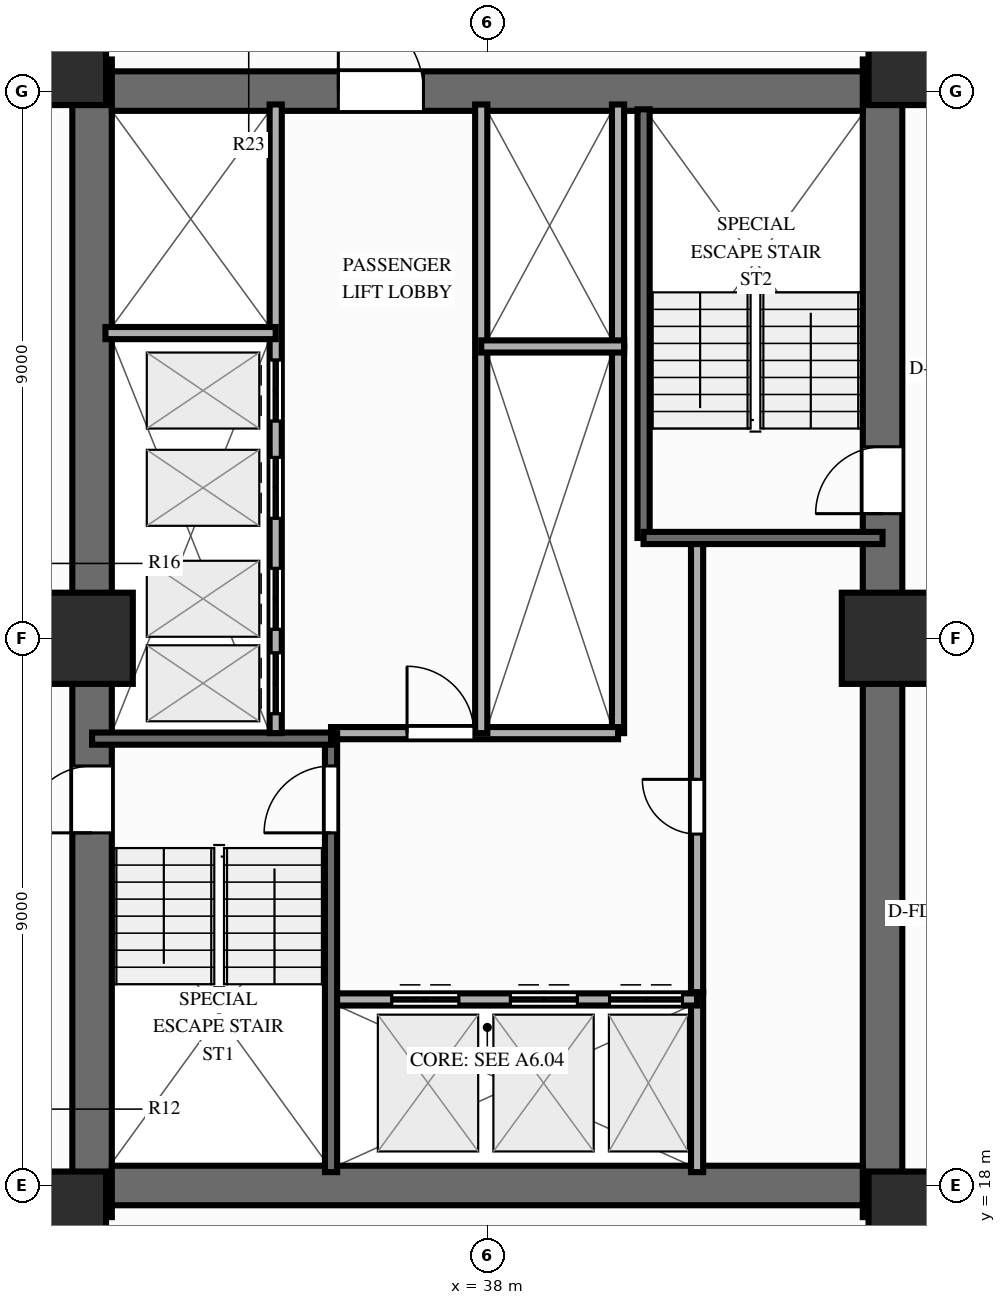
"""IFC4 building model, lengths in metres.
Left out: names, types, materials, properties, quantities, classifications, styles, units other than length and angle.
Written with IfcOpenShell. Run it as: python <this file> out.ifc"""

import sys

from ifc_helpers import new_model, si_unit, direction, frame, frame_2d, origin, origin_2d, place, context, subcontext, project, spatial, rectangle, extrude, source, transform, mapped, element, fill, save


model = new_model("IFC4")
c1 = context("Model", 3, precision=1e-05, world=origin(), true_north=direction((0.0, 1.0)))
c2 = subcontext(c1, "Body", "Model", "MODEL_VIEW")
j1 = project(units=[si_unit("LENGTHUNIT", "METRE"), si_unit("PLANEANGLEUNIT", "RADIAN")], contexts=[c1])
p1 = place(None, origin())
s1 = spatial("IfcSite", under=j1, at=p1, CompositionType="ELEMENT")
p2 = place(p1, origin())
s2 = spatial("IfcBuilding", under=s1, at=p2, CompositionType="ELEMENT")
p3 = place(p2, frame((0.0, 0.0, 49.4)))
s3 = spatial("IfcBuildingStorey", under=s2, at=p3, CompositionType="ELEMENT", Elevation=49.4)
p4 = place(p3, frame((31.5, 17.48, 0.0), z_axis=(0.0, 0.0, 1.0), x_axis=(0.0, 1.0, 0.0)))
e1 = element("IfcWall", 1, at=p4, inside=s3, PredefinedType="SHEAR", context=c2, shape_type="SweptSolid", body=[
    extrude(rectangle(XDim=19.04, YDim=0.65, at=frame_2d((9.52, 0.0))), origin(), (0.0, 0.0, 1.0), 3.0),
])
p5 = place(p4, frame((6.32, 0.0, 0.0)))
e2 = element("IfcOpeningElement", 2, at=p5, cuts=e1, PredefinedType="OPENING", context=c2, shape_type="SweptSolid", body=[
    extrude(rectangle(XDim=1.1, YDim=2.15, at=frame_2d((0.55, 1.075))), frame((0.0, 0.337, 0.0), z_axis=(0.0, -1.0, 0.0), x_axis=(1.0, 0.0, 0.0)), (0.0, 0.0, 1.0), 0.674),
])
p6 = place(p3, frame((44.5, 17.48, 0.0), z_axis=(0.0, 0.0, 1.0), x_axis=(0.0, 1.0, 0.0)))
e3 = element("IfcWall", 3, at=p6, inside=s3, PredefinedType="SHEAR", context=c2, shape_type="SweptSolid", body=[
    extrude(rectangle(XDim=19.04, YDim=0.65, at=frame_2d((9.52, 0.0))), origin(), (0.0, 0.0, 1.0), 3.0),
])
p7 = place(p6, frame((12.67, 0.0, 0.0), z_axis=(0.0, 0.0, 1.0), x_axis=(-1.0, 0.0, 0.0)))
e4 = element("IfcOpeningElement", 4, at=p7, cuts=e3, PredefinedType="OPENING", context=c2, shape_type="SweptSolid", body=[
    extrude(rectangle(XDim=1.1, YDim=2.15, at=frame_2d((0.55, 1.075))), frame((0.0, 0.337, 0.0), z_axis=(0.0, -1.0, 0.0), x_axis=(1.0, 0.0, 0.0)), (0.0, 0.0, 1.0), 0.674),
])
p8 = place(p3, frame((31.825, 18.0, 0.0), z_axis=(0.0, 0.0, 1.0), x_axis=(1.0, 0.0, 0.0)))
e5 = element("IfcWall", 5, at=p8, inside=s3, PredefinedType="SHEAR", context=c2, shape_type="SweptSolid", body=[
    extrude(rectangle(XDim=12.35, YDim=0.65, at=frame_2d((6.175, 0.0))), origin(), (0.0, 0.0, 1.0), 3.0),
])
p9 = place(p3, frame((31.825, 36.0, 0.0), z_axis=(0.0, 0.0, 1.0), x_axis=(1.0, 0.0, 0.0)))
e6 = element("IfcWall", 6, at=p9, inside=s3, PredefinedType="SHEAR", context=c2, shape_type="SweptSolid", body=[
    extrude(rectangle(XDim=12.35, YDim=0.65, at=frame_2d((6.175, 0.0))), origin(), (0.0, 0.0, 1.0), 3.0),
])
p10 = place(p9, frame((5.125, 0.0, 0.0), z_axis=(0.0, 0.0, 1.0), x_axis=(-1.0, 0.0, 0.0)))
e7 = element("IfcOpeningElement", 7, at=p10, cuts=e6, PredefinedType="OPENING", context=c2, shape_type="SweptSolid", body=[
    extrude(rectangle(XDim=1.4, YDim=2.15, at=frame_2d((0.7, 1.075))), frame((0.0, 0.337, 0.0), z_axis=(0.0, -1.0, 0.0), x_axis=(1.0, 0.0, 0.0)), (0.0, 0.0, 1.0), 0.674),
])
m1 = source(origin(), c2, "Body", "SweptSolid", [
    extrude(rectangle(XDim=1.5, YDim=1.5, at=origin_2d()), origin(), (0.0, 0.0, 1.0), 3.0),
])
for number, where, z_axis, x_axis in (
    (8, (30.98, 17.48, 0.0), (0.0, 0.0, 1.0), (1.0, 0.0, 0.0)),
    (9, (45.02, 17.48, 0.0), (0.0, 0.0, 1.0), (1.0, 0.0, 0.0)),
    (10, (30.98, 36.52, 0.0), (0.0, 0.0, 1.0), (1.0, 0.0, 0.0)),
    (11, (45.02, 36.52, 0.0), (0.0, 0.0, 1.0), (1.0, 0.0, 0.0)),
    (12, (31.42, 27.0, 0.0), (0.0, 0.0, 1.0), (1.0, 0.0, 0.0)),
    (13, (44.58, 27.0, 0.0), (0.0, 0.0, 1.0), (1.0, 0.0, 0.0)),
):
    element("IfcColumn", number, at=place(p3, frame(where, z_axis=z_axis, x_axis=x_axis)), inside=s3, PredefinedType="COLUMN", context=c2, shape_type="MappedRepresentation", body=[
        mapped(m1, transform((0.0, 0.0, 0.0), scale=1.0)),
    ])
p11 = place(p3, frame((41.45, 18.22, 0.0), z_axis=(0.0, 0.0, 1.0), x_axis=(0.0, 1.0, 0.0)))
e14 = element("IfcWall", 14, at=p11, inside=s3, PredefinedType="PARTITIONING", context=c2, shape_type="SweptSolid", body=[
    extrude(rectangle(XDim=2.96, YDim=0.2, at=frame_2d((1.48, 0.0))), origin(), (0.0, 0.0, 1.0), 2.79),
])
p12 = place(p3, frame((41.45, 21.18, 0.0), z_axis=(0.0, 0.0, 1.0), x_axis=(0.0, 1.0, 0.0)))
e15 = element("IfcWall", 15, at=p12, inside=s3, PredefinedType="PARTITIONING", context=c2, shape_type="SweptSolid", body=[
    extrude(rectangle(XDim=7.42, YDim=0.2, at=frame_2d((3.71, 0.0))), origin(), (0.0, 0.0, 1.0), 2.79),
])
p13 = place(p12, frame((2.6, 0.0, 0.0)))
e16 = element("IfcOpeningElement", 16, at=p13, cuts=e15, PredefinedType="OPENING", context=c2, shape_type="SweptSolid", body=[
    extrude(rectangle(XDim=0.9, YDim=2.1, at=frame_2d((0.45, 1.05))), frame((0.0, 0.112, 0.0), z_axis=(0.0, -1.0, 0.0), x_axis=(1.0, 0.0, 0.0)), (0.0, 0.0, 1.0), 0.224),
])
p14 = place(p3, frame((40.15, 25.44, 0.0), z_axis=(0.0, 0.0, 1.0), x_axis=(0.0, 1.0, 0.0)))
e17 = element("IfcWall", 17, at=p14, inside=s3, PredefinedType="PARTITIONING", context=c2, shape_type="SweptSolid", body=[
    extrude(rectangle(XDim=6.36, YDim=0.2, at=frame_2d((3.18, 0.0))), origin(), (0.0, 0.0, 1.0), 2.79),
])
p15 = place(p3, frame((40.15, 31.8, 0.0), z_axis=(0.0, 0.0, 1.0), x_axis=(0.0, 1.0, 0.0)))
e18 = element("IfcWall", 18, at=p15, inside=s3, PredefinedType="PARTITIONING", context=c2, shape_type="SweptSolid", body=[
    extrude(rectangle(XDim=3.98, YDim=0.2, at=frame_2d((1.99, 0.0))), origin(), (0.0, 0.0, 1.0), 2.79),
])
p16 = place(p3, frame((35.43, 21.06, 0.0), z_axis=(0.0, 0.0, 1.0), x_axis=(1.0, 0.0, 0.0)))
e19 = element("IfcWall", 19, at=p16, inside=s3, PredefinedType="PARTITIONING", context=c2, shape_type="SweptSolid", body=[
    extrude(rectangle(XDim=6.02, YDim=0.2, at=frame_2d((3.01, 0.0))), origin(), (0.0, 0.0, 1.0), 2.79),
])
p17 = place(p16, frame((1.0, 0.0, 0.0)))
e20 = element("IfcOpeningElement", 20, at=p17, cuts=e19, PredefinedType="OPENING", context=c2, shape_type="SweptSolid", body=[
    extrude(rectangle(XDim=1.1, YDim=2.15, at=frame_2d((0.55, 1.075))), frame((0.0, 0.112, 0.0), z_axis=(0.0, -1.0, 0.0), x_axis=(1.0, 0.0, 0.0)), (0.0, 0.0, 1.0), 0.224),
])
p18 = place(p16, frame((2.95, 0.0, 0.0)))
e21 = element("IfcOpeningElement", 21, at=p18, cuts=e19, PredefinedType="OPENING", context=c2, shape_type="SweptSolid", body=[
    extrude(rectangle(XDim=1.1, YDim=2.15, at=frame_2d((0.55, 1.075))), frame((0.0, 0.112, 0.0), z_axis=(0.0, -1.0, 0.0), x_axis=(1.0, 0.0, 0.0)), (0.0, 0.0, 1.0), 0.224),
])
p19 = place(p16, frame((4.58, 0.0, 0.0)))
e22 = element("IfcOpeningElement", 22, at=p19, cuts=e19, PredefinedType="OPENING", context=c2, shape_type="SweptSolid", body=[
    extrude(rectangle(XDim=1.2, YDim=2.15, at=frame_2d((0.6, 1.075))), frame((0.0, 0.112, 0.0), z_axis=(0.0, -1.0, 0.0), x_axis=(1.0, 0.0, 0.0)), (0.0, 0.0, 1.0), 0.224),
])
p20 = place(p3, frame((35.43, 25.44, 0.0), z_axis=(0.0, 0.0, 1.0), x_axis=(1.0, 0.0, 0.0)))
e23 = element("IfcWall", 23, at=p20, inside=s3, PredefinedType="PARTITIONING", context=c2, shape_type="SweptSolid", body=[
    extrude(rectangle(XDim=4.72, YDim=0.2, at=frame_2d((2.36, 0.0))), origin(), (0.0, 0.0, 1.0), 2.79),
])
p21 = place(p20, frame((1.25, 0.0, 0.0)))
e24 = element("IfcOpeningElement", 24, at=p21, cuts=e23, PredefinedType="OPENING", context=c2, shape_type="SweptSolid", body=[
    extrude(rectangle(XDim=1.1, YDim=2.15, at=frame_2d((0.55, 1.075))), frame((0.0, 0.112, 0.0), z_axis=(0.0, -1.0, 0.0), x_axis=(1.0, 0.0, 0.0)), (0.0, 0.0, 1.0), 0.224),
])
p22 = place(p3, frame((35.43, 18.22, 0.0), z_axis=(0.0, 0.0, 1.0), x_axis=(0.0, 1.0, 0.0)))
e25 = element("IfcWall", 25, at=p22, inside=s3, PredefinedType="SOLIDWALL", context=c2, shape_type="SweptSolid", body=[
    extrude(rectangle(XDim=7.22, YDim=0.2, at=frame_2d((3.61, 0.0))), origin(), (0.0, 0.0, 1.0), 2.79),
])
p23 = place(p22, frame((6.68, 0.0, 0.0), z_axis=(0.0, 0.0, 1.0), x_axis=(-1.0, 0.0, 0.0)))
e26 = element("IfcOpeningElement", 26, at=p23, cuts=e25, PredefinedType="OPENING", context=c2, shape_type="SweptSolid", body=[
    extrude(rectangle(XDim=1.1, YDim=2.15, at=frame_2d((0.55, 1.075))), frame((0.0, 0.112, 0.0), z_axis=(0.0, -1.0, 0.0), x_axis=(1.0, 0.0, 0.0)), (0.0, 0.0, 1.0), 0.224),
])
p24 = place(p3, frame((31.5, 25.35, 0.0), z_axis=(0.0, 0.0, 1.0), x_axis=(1.0, 0.0, 0.0)))
e27 = element("IfcWall", 27, at=p24, inside=s3, PredefinedType="SOLIDWALL", context=c2, shape_type="SweptSolid", body=[
    extrude(rectangle(XDim=3.93, YDim=0.2, at=frame_2d((1.965, 0.0))), origin(), (0.0, 0.0, 1.0), 2.79),
])
p25 = place(p3, frame((40.57, 28.65, 0.0), z_axis=(0.0, 0.0, 1.0), x_axis=(0.0, 1.0, 0.0)))
e28 = element("IfcWall", 28, at=p25, inside=s3, PredefinedType="SOLIDWALL", context=c2, shape_type="SweptSolid", body=[
    extrude(rectangle(XDim=7.05, YDim=0.2, at=frame_2d((3.525, 0.0))), origin(), (0.0, 0.0, 1.0), 2.79),
])
p26 = place(p3, frame((40.57, 28.65, 0.0), z_axis=(0.0, 0.0, 1.0), x_axis=(1.0, 0.0, 0.0)))
e29 = element("IfcWall", 29, at=p26, inside=s3, PredefinedType="SOLIDWALL", context=c2, shape_type="SweptSolid", body=[
    extrude(rectangle(XDim=3.93, YDim=0.2, at=frame_2d((1.965, 0.0))), origin(), (0.0, 0.0, 1.0), 2.79),
])
p27 = place(p3, frame((34.52, 25.44, 0.0), z_axis=(0.0, 0.0, 1.0), x_axis=(0.0, 1.0, 0.0)))
e30 = element("IfcWall", 30, at=p27, inside=s3, PredefinedType="PARTITIONING", context=c2, shape_type="SweptSolid", body=[
    extrude(rectangle(XDim=10.34, YDim=0.2, at=frame_2d((5.17, 0.0))), origin(), (0.0, 0.0, 1.0), 2.79),
])
p28 = place(p27, frame((0.32, 0.0, 0.0)))
e31 = element("IfcOpeningElement", 31, at=p28, cuts=e30, PredefinedType="OPENING", context=c2, shape_type="SweptSolid", body=[
    extrude(rectangle(XDim=1.0, YDim=2.15, at=frame_2d((0.5, 1.075))), frame((0.0, 0.112, 0.0), z_axis=(0.0, -1.0, 0.0), x_axis=(1.0, 0.0, 0.0)), (0.0, 0.0, 1.0), 0.224),
])
p29 = place(p27, frame((1.71, 0.0, 0.0)))
e32 = element("IfcOpeningElement", 32, at=p29, cuts=e30, PredefinedType="OPENING", context=c2, shape_type="SweptSolid", body=[
    extrude(rectangle(XDim=1.0, YDim=2.15, at=frame_2d((0.5, 1.075))), frame((0.0, 0.112, 0.0), z_axis=(0.0, -1.0, 0.0), x_axis=(1.0, 0.0, 0.0)), (0.0, 0.0, 1.0), 0.224),
])
p30 = place(p27, frame((3.535, 0.0, 0.0)))
e33 = element("IfcOpeningElement", 33, at=p30, cuts=e30, PredefinedType="OPENING", context=c2, shape_type="SweptSolid", body=[
    extrude(rectangle(XDim=1.0, YDim=2.15, at=frame_2d((0.5, 1.075))), frame((0.0, 0.112, 0.0), z_axis=(0.0, -1.0, 0.0), x_axis=(1.0, 0.0, 0.0)), (0.0, 0.0, 1.0), 0.224),
])
p31 = place(p27, frame((5.135, 0.0, 0.0)))
e34 = element("IfcOpeningElement", 34, at=p31, cuts=e30, PredefinedType="OPENING", context=c2, shape_type="SweptSolid", body=[
    extrude(rectangle(XDim=1.0, YDim=2.15, at=frame_2d((0.5, 1.075))), frame((0.0, 0.112, 0.0), z_axis=(0.0, -1.0, 0.0), x_axis=(1.0, 0.0, 0.0)), (0.0, 0.0, 1.0), 0.224),
])
p32 = place(p3, frame((31.72, 32.02, 0.0), z_axis=(0.0, 0.0, 1.0), x_axis=(1.0, 0.0, 0.0)))
e35 = element("IfcWall", 35, at=p32, inside=s3, PredefinedType="PARTITIONING", context=c2, shape_type="SweptSolid", body=[
    extrude(rectangle(XDim=2.8, YDim=0.2, at=frame_2d((1.4, 0.0))), origin(), (0.0, 0.0, 1.0), 2.79),
])
p33 = place(p3, frame((37.9, 25.44, 0.0), z_axis=(0.0, 0.0, 1.0), x_axis=(0.0, 1.0, 0.0)))
e36 = element("IfcWall", 36, at=p33, inside=s3, PredefinedType="PARTITIONING", context=c2, shape_type="SweptSolid", body=[
    extrude(rectangle(XDim=10.34, YDim=0.2, at=frame_2d((5.17, 0.0))), origin(), (0.0, 0.0, 1.0), 2.79),
])
p34 = place(p3, frame((37.9, 31.8, 0.0), z_axis=(0.0, 0.0, 1.0), x_axis=(1.0, 0.0, 0.0)))
e37 = element("IfcWall", 37, at=p34, inside=s3, PredefinedType="PARTITIONING", context=c2, shape_type="SweptSolid", body=[
    extrude(rectangle(XDim=2.35, YDim=0.2, at=frame_2d((1.175, 0.0))), origin(), (0.0, 0.0, 1.0), 2.79),
])
m2 = source(origin(), c2, "Body", "SweptSolid", [
    extrude(rectangle(XDim=1.1, YDim=2.15, at=frame_2d((0.55, 1.075))), frame((0.0, 0.025, 0.0), z_axis=(0.0, -1.0, 0.0), x_axis=(1.0, 0.0, 0.0)), (0.0, 0.0, 1.0), 0.05),
])
p35 = place(p5, origin())
e38 = element("IfcDoor", 38, at=p35, inside=s3, OperationType="SINGLE_SWING_LEFT", PredefinedType="DOOR", context=c2, shape_type="MappedRepresentation", body=[
    mapped(m2, transform((0.0, 0.0, 0.0), scale=1.0)),
])
fill(e2, e38)
p36 = place(p7, origin())
e39 = element("IfcDoor", 39, at=p36, inside=s3, OperationType="SINGLE_SWING_RIGHT", PredefinedType="DOOR", context=c2, shape_type="MappedRepresentation", body=[
    mapped(m2, transform((0.0, 0.0, 0.0), scale=1.0)),
])
fill(e4, e39)
m3 = source(origin(), c2, "Body", "SweptSolid", [
    extrude(rectangle(XDim=1.4, YDim=2.15, at=frame_2d((0.7, 1.075))), frame((0.0, 0.025, 0.0), z_axis=(0.0, -1.0, 0.0), x_axis=(1.0, 0.0, 0.0)), (0.0, 0.0, 1.0), 0.05),
])
p37 = place(p10, origin())
e40 = element("IfcDoor", 40, at=p37, inside=s3, OperationType="SINGLE_SWING_RIGHT", PredefinedType="DOOR", context=c2, shape_type="MappedRepresentation", body=[
    mapped(m3, transform((0.0, 0.0, 0.0), scale=1.0)),
])
fill(e7, e40)
m4 = source(origin(), c2, "Body", "SweptSolid", [
    extrude(rectangle(XDim=0.9, YDim=2.1, at=frame_2d((0.45, 1.05))), frame((0.0, 0.025, 0.0), z_axis=(0.0, -1.0, 0.0), x_axis=(1.0, 0.0, 0.0)), (0.0, 0.0, 1.0), 0.05),
])
p38 = place(p13, origin())
e41 = element("IfcDoor", 41, at=p38, inside=s3, OperationType="SINGLE_SWING_RIGHT", PredefinedType="DOOR", context=c2, shape_type="MappedRepresentation", body=[
    mapped(m4, transform((0.0, 0.0, 0.0), scale=1.0)),
])
fill(e16, e41)
p39 = place(p17, origin())
e42 = element("IfcDoor", 42, at=p39, inside=s3, OperationType="DOUBLE_DOOR_SLIDING", PredefinedType="DOOR", context=c2, shape_type="MappedRepresentation", body=[
    mapped(m2, transform((0.0, 0.0, 0.0), scale=1.0)),
])
fill(e20, e42)
p40 = place(p18, origin())
e43 = element("IfcDoor", 43, at=p40, inside=s3, OperationType="DOUBLE_DOOR_SLIDING", PredefinedType="DOOR", context=c2, shape_type="MappedRepresentation", body=[
    mapped(m2, transform((0.0, 0.0, 0.0), scale=1.0)),
])
fill(e21, e43)
m5 = source(origin(), c2, "Body", "SweptSolid", [
    extrude(rectangle(XDim=1.2, YDim=2.15, at=frame_2d((0.6, 1.075))), frame((0.0, 0.025, 0.0), z_axis=(0.0, -1.0, 0.0), x_axis=(1.0, 0.0, 0.0)), (0.0, 0.0, 1.0), 0.05),
])
p41 = place(p19, origin())
e44 = element("IfcDoor", 44, at=p41, inside=s3, OperationType="DOUBLE_DOOR_SLIDING", PredefinedType="DOOR", context=c2, shape_type="MappedRepresentation", body=[
    mapped(m5, transform((0.0, 0.0, 0.0), scale=1.0)),
])
fill(e22, e44)
p42 = place(p21, origin())
e45 = element("IfcDoor", 45, at=p42, inside=s3, OperationType="SINGLE_SWING_LEFT", PredefinedType="DOOR", context=c2, shape_type="MappedRepresentation", body=[
    mapped(m2, transform((0.0, 0.0, 0.0), scale=1.0)),
])
fill(e24, e45)
p43 = place(p23, origin())
e46 = element("IfcDoor", 46, at=p43, inside=s3, OperationType="SINGLE_SWING_RIGHT", PredefinedType="DOOR", context=c2, shape_type="MappedRepresentation", body=[
    mapped(m2, transform((0.0, 0.0, 0.0), scale=1.0)),
])
fill(e26, e46)
m6 = source(origin(), c2, "Body", "SweptSolid", [
    extrude(rectangle(XDim=1.0, YDim=2.15, at=frame_2d((0.5, 1.075))), frame((0.0, 0.025, 0.0), z_axis=(0.0, -1.0, 0.0), x_axis=(1.0, 0.0, 0.0)), (0.0, 0.0, 1.0), 0.05),
])
p44 = place(p28, origin())
e47 = element("IfcDoor", 47, at=p44, inside=s3, OperationType="DOUBLE_DOOR_SLIDING", PredefinedType="DOOR", context=c2, shape_type="MappedRepresentation", body=[
    mapped(m6, transform((0.0, 0.0, 0.0), scale=1.0)),
])
fill(e31, e47)
p45 = place(p29, origin())
e48 = element("IfcDoor", 48, at=p45, inside=s3, OperationType="DOUBLE_DOOR_SLIDING", PredefinedType="DOOR", context=c2, shape_type="MappedRepresentation", body=[
    mapped(m6, transform((0.0, 0.0, 0.0), scale=1.0)),
])
fill(e32, e48)
p46 = place(p30, origin())
e49 = element("IfcDoor", 49, at=p46, inside=s3, OperationType="DOUBLE_DOOR_SLIDING", PredefinedType="DOOR", context=c2, shape_type="MappedRepresentation", body=[
    mapped(m6, transform((0.0, 0.0, 0.0), scale=1.0)),
])
fill(e33, e49)
p47 = place(p31, origin())
e50 = element("IfcDoor", 50, at=p47, inside=s3, OperationType="DOUBLE_DOOR_SLIDING", PredefinedType="DOOR", context=c2, shape_type="MappedRepresentation", body=[
    mapped(m6, transform((0.0, 0.0, 0.0), scale=1.0)),
])
fill(e34, e50)
save(model, sys.argv[1])
